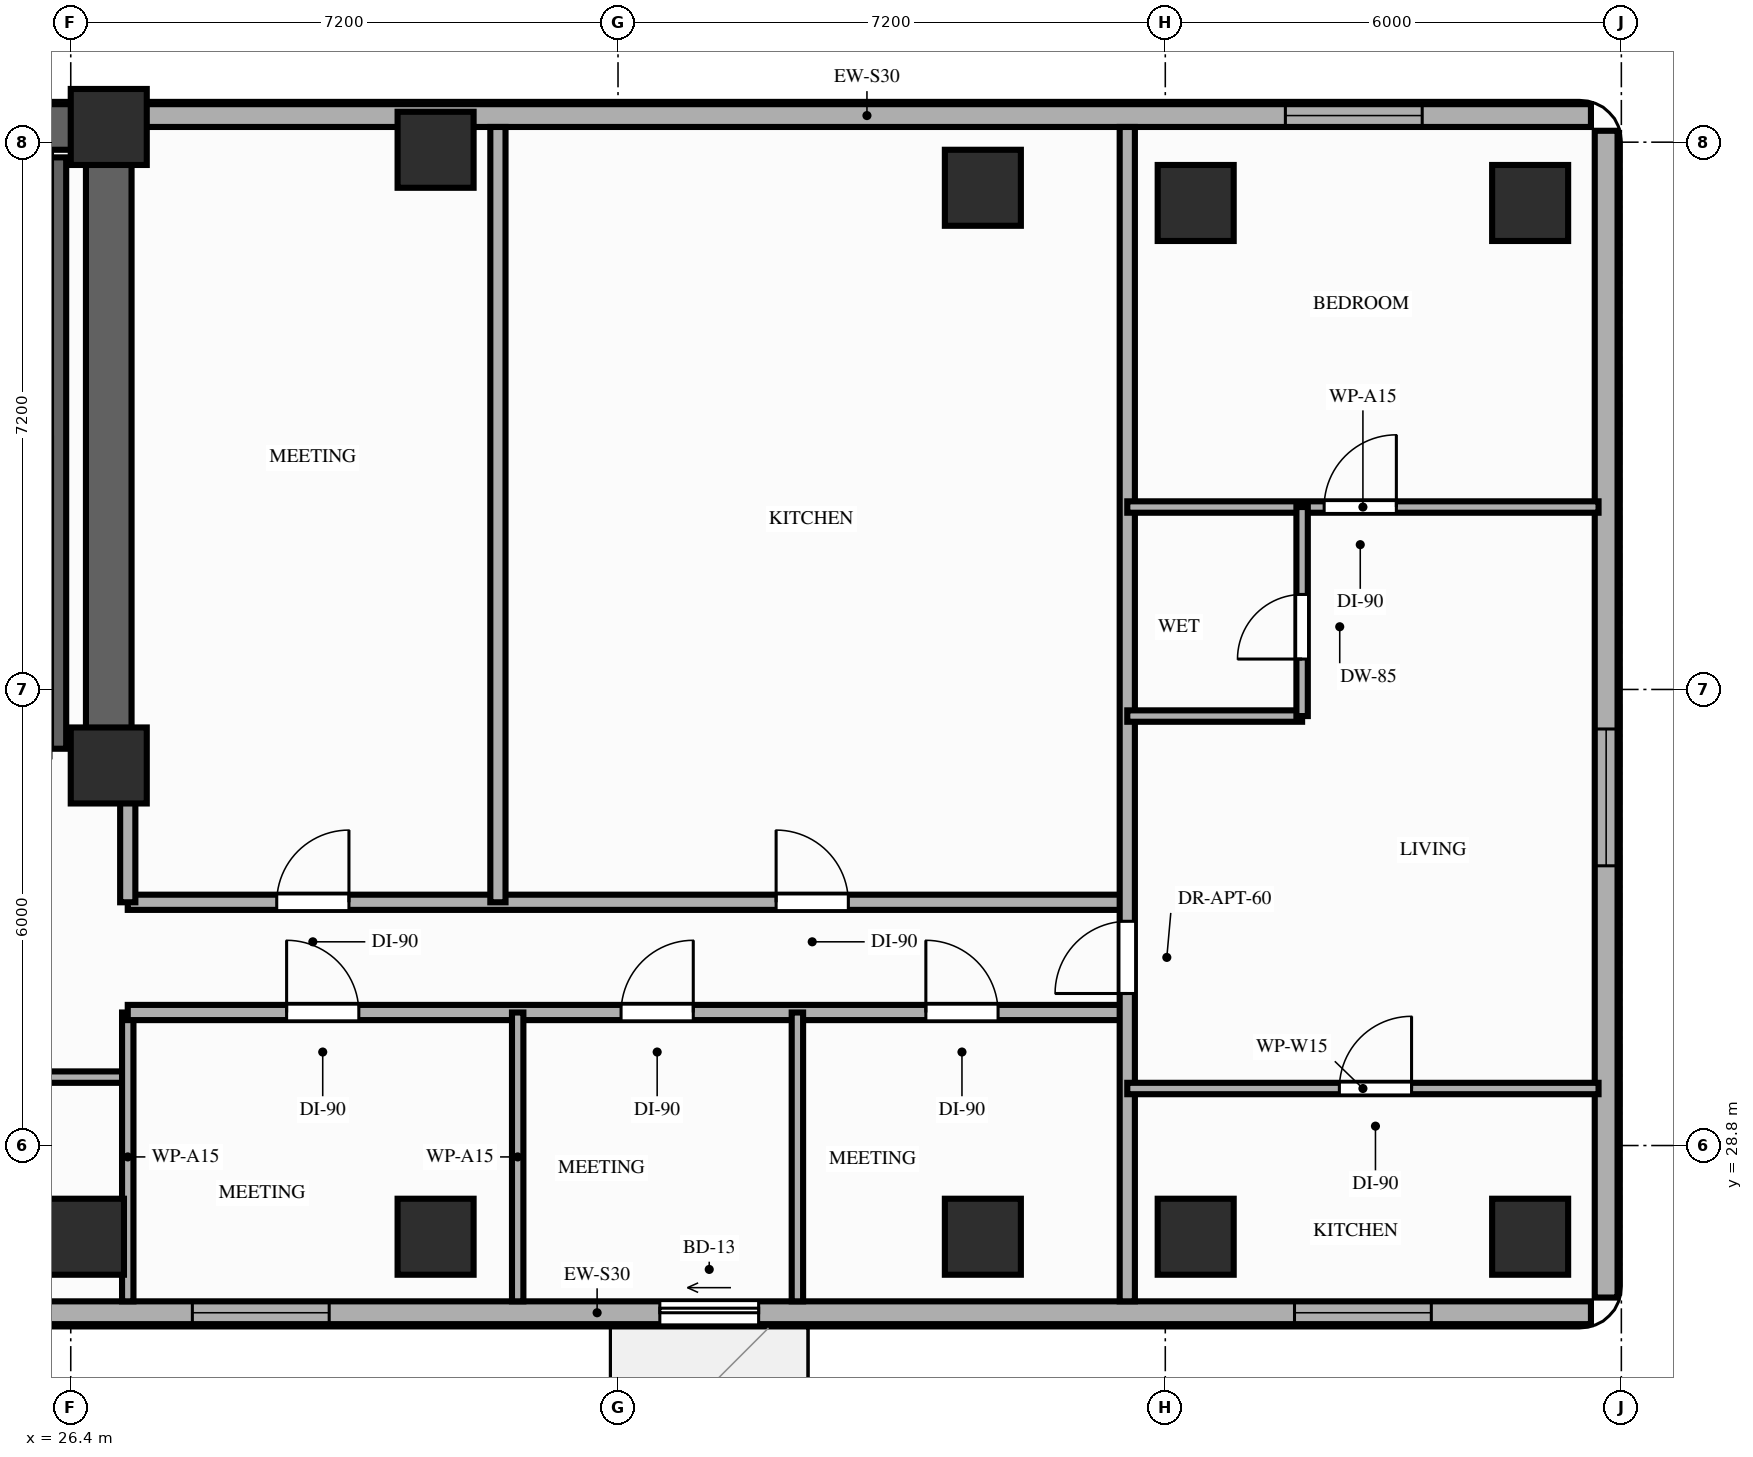
"""IFC4 building model, lengths in metres.
Left out: names, types, materials, properties, quantities, classifications, styles, units other than length and angle.
Written with IfcOpenShell. Run it as: python <this file> out.ifc"""

import sys

from ifc_helpers import new_model, si_unit, direction, frame, frame_2d, origin, origin_2d, place, context, subcontext, project, spatial, rectangle, extrude, element, fill, save


model = new_model("IFC4")
c1 = context("Model", 3, precision=1e-05, world=origin(), true_north=direction((0.0, 1.0)))
c2 = subcontext(c1, "Body", "Model", "MODEL_VIEW")
j1 = project(units=[si_unit("LENGTHUNIT", "METRE"), si_unit("PLANEANGLEUNIT", "RADIAN")], contexts=[c1])
p1 = place(None, origin())
s1 = spatial("IfcSite", under=j1, at=p1, CompositionType="ELEMENT")
p2 = place(p1, origin())
s2 = spatial("IfcBuilding", under=s1, at=p2, CompositionType="ELEMENT")
p3 = place(p2, frame((0.0, 0.0, 129.8)))
s3 = spatial("IfcBuildingStorey", under=s2, at=p3, CompositionType="ELEMENT", Elevation=129.8)
for number, where, z_axis, x_axis in (
    (1, (26.9, 33.8, 0.0), (0.0, 0.0, 1.0), (1.0, 0.0, 0.0)),
    (2, (26.9, 42.2, 0.0), (0.0, 0.0, 1.0), (1.0, 0.0, 0.0)),
    (3, (26.6, 27.6, 0.0), (0.0, 0.0, 1.0), (1.0, 0.0, 0.0)),
    (4, (31.2, 27.6, 0.0), (0.0, 0.0, 1.0), (1.0, 0.0, 0.0)),
    (5, (31.2, 41.9, 0.0), (0.0, 0.0, 1.0), (1.0, 0.0, 0.0)),
    (6, (38.4, 27.6, 0.0), (0.0, 0.0, 1.0), (1.0, 0.0, 0.0)),
    (7, (38.4, 41.4, 0.0), (0.0, 0.0, 1.0), (1.0, 0.0, 0.0)),
    (8, (41.2, 27.6, 0.0), (0.0, 0.0, 1.0), (1.0, 0.0, 0.0)),
    (9, (41.2, 41.2, 0.0), (0.0, 0.0, 1.0), (1.0, 0.0, 0.0)),
    (10, (45.6, 27.6, 0.0), (0.0, 0.0, 1.0), (1.0, 0.0, 0.0)),
    (11, (45.6, 41.2, 0.0), (0.0, 0.0, 1.0), (1.0, 0.0, 0.0)),
):
    element("IfcColumn", number, at=place(p3, frame(where, z_axis=z_axis, x_axis=x_axis)), inside=s3, PredefinedType="COLUMN", context=c2, shape_type="SweptSolid", body=[
        extrude(rectangle(XDim=1.0, YDim=1.0, at=origin_2d()), origin(), (0.0, 0.0, 1.0), 3.2),
    ])
p4 = place(p3, frame((46.4, 42.35, 0.0), z_axis=(0.0, 0.0, 1.0), x_axis=(-1.0, 0.0, 0.0)))
e12 = element("IfcWall", 12, at=p4, inside=s3, PredefinedType="STANDARD", context=c2, shape_type="SweptSolid", body=[
    extrude(rectangle(XDim=19.05, YDim=0.3, at=frame_2d((9.525, 0.0))), origin(), (0.0, 0.0, 1.0), 2.45),
])
p5 = place(p4, frame((2.22, 0.0, 0.85)))
e13 = element("IfcOpeningElement", 13, at=p5, cuts=e12, PredefinedType="OPENING", context=c2, shape_type="SweptSolid", body=[
    extrude(rectangle(XDim=1.8, YDim=1.35, at=frame_2d((0.9, 0.675))), frame((0.0, 0.16, 0.0), z_axis=(0.0, -1.0, 0.0), x_axis=(1.0, 0.0, 0.0)), (0.0, 0.0, 1.0), 0.32),
])
p6 = place(p3, frame((20.25, 26.6, 0.0), z_axis=(0.0, 0.0, 1.0), x_axis=(1.0, 0.0, 0.0)))
e14 = element("IfcWall", 14, at=p6, inside=s3, PredefinedType="STANDARD", context=c2, shape_type="SweptSolid", body=[
    extrude(rectangle(XDim=26.15, YDim=0.3, at=frame_2d((13.075, 0.0))), origin(), (0.0, 0.0, 1.0), 2.71),
])
p7 = place(p6, frame((13.9, 0.0, 0.0)))
e15 = element("IfcOpeningElement", 15, at=p7, cuts=e14, PredefinedType="OPENING", context=c2, shape_type="SweptSolid", body=[
    extrude(rectangle(XDim=1.3, YDim=2.08, at=frame_2d((0.65, 1.04))), frame((0.0, 0.16, 0.0), z_axis=(0.0, -1.0, 0.0), x_axis=(1.0, 0.0, 0.0)), (0.0, 0.0, 1.0), 0.32),
])
p8 = place(p6, frame((2.25, 0.0, 0.85)))
e16 = element("IfcOpeningElement", 16, at=p8, cuts=e14, PredefinedType="OPENING", context=c2, shape_type="SweptSolid", body=[
    extrude(rectangle(XDim=1.8, YDim=1.61, at=frame_2d((0.9, 0.805))), frame((0.0, 0.16, 0.0), z_axis=(0.0, -1.0, 0.0), x_axis=(1.0, 0.0, 0.0)), (0.0, 0.0, 1.0), 0.32),
])
p9 = place(p6, frame((7.75, 0.0, 0.85)))
e17 = element("IfcOpeningElement", 17, at=p9, cuts=e14, PredefinedType="OPENING", context=c2, shape_type="SweptSolid", body=[
    extrude(rectangle(XDim=1.8, YDim=1.61, at=frame_2d((0.9, 0.805))), frame((0.0, 0.16, 0.0), z_axis=(0.0, -1.0, 0.0), x_axis=(1.0, 0.0, 0.0)), (0.0, 0.0, 1.0), 0.32),
])
p10 = place(p6, frame((22.25, 0.0, 0.85)))
e18 = element("IfcOpeningElement", 18, at=p10, cuts=e14, PredefinedType="OPENING", context=c2, shape_type="SweptSolid", body=[
    extrude(rectangle(XDim=1.8, YDim=1.61, at=frame_2d((0.9, 0.805))), frame((0.0, 0.16, 0.0), z_axis=(0.0, -1.0, 0.0), x_axis=(1.0, 0.0, 0.0)), (0.0, 0.0, 1.0), 0.32),
])
p11 = place(p3, frame((46.6, 26.8, 0.0), z_axis=(0.0, 0.0, 1.0), x_axis=(0.0, 1.0, 0.0)))
e19 = element("IfcWall", 19, at=p11, inside=s3, PredefinedType="STANDARD", context=c2, shape_type="SweptSolid", body=[
    extrude(rectangle(XDim=15.35, YDim=0.3, at=frame_2d((7.675, 0.0))), origin(), (0.0, 0.0, 1.0), 3.02),
])
p12 = place(p11, frame((5.68, 0.0, 0.85)))
e20 = element("IfcOpeningElement", 20, at=p12, cuts=e19, PredefinedType="OPENING", context=c2, shape_type="SweptSolid", body=[
    extrude(rectangle(XDim=1.8, YDim=1.75, at=frame_2d((0.9, 0.875))), frame((0.0, 0.16, 0.0), z_axis=(0.0, -1.0, 0.0), x_axis=(1.0, 0.0, 0.0)), (0.0, 0.0, 1.0), 0.32),
])
p13 = place(p3, frame((6.45, 42.2, 0.0), z_axis=(0.0, 0.0, 1.0), x_axis=(1.0, 0.0, 0.0)))
e21 = element("IfcWall", 21, at=p13, inside=s3, PredefinedType="SHEAR", context=c2, shape_type="SweptSolid", body=[
    extrude(rectangle(XDim=20.45, YDim=0.6, at=frame_2d((10.225, 0.0))), origin(), (0.0, 0.0, 1.0), 3.02),
])
p14 = place(p3, frame((26.9, 33.8, 0.0), z_axis=(0.0, 0.0, 1.0), x_axis=(0.0, 1.0, 0.0)))
e22 = element("IfcWall", 22, at=p14, inside=s3, PredefinedType="SHEAR", context=c2, shape_type="SweptSolid", body=[
    extrude(rectangle(XDim=7.95, YDim=0.6, at=frame_2d((3.975, 0.0))), origin(), (0.0, 0.0, 1.0), 3.02),
])
p15 = place(p3, frame((26.24, 34.02, 0.0), z_axis=(0.0, 0.0, 1.0), x_axis=(0.0, 1.0, 0.0)))
e23 = element("IfcWall", 23, at=p15, inside=s3, PredefinedType="SHEAR", context=c2, shape_type="SweptSolid", body=[
    extrude(rectangle(XDim=7.78, YDim=0.2, at=frame_2d((3.89, 0.0))), origin(), (0.0, 0.0, 1.0), 3.02),
])
p16 = place(p3, frame((20.45, 29.7, 0.0), z_axis=(0.0, 0.0, 1.0), x_axis=(1.0, 0.0, 0.0)))
e24 = element("IfcWall", 24, at=p16, inside=s3, PredefinedType="PARTITIONING", context=c2, shape_type="SweptSolid", body=[
    extrude(rectangle(XDim=6.7, YDim=0.15, at=frame_2d((3.35, 0.0))), origin(), (0.0, 0.0, 1.0), 3.02),
])
p17 = place(p16, frame((2.8, 0.0, 0.0)))
e25 = element("IfcOpeningElement", 25, at=p17, cuts=e24, PredefinedType="OPENING", context=c2, shape_type="SweptSolid", body=[
    extrude(rectangle(XDim=0.95, YDim=2.15, at=frame_2d((0.475, 1.075))), frame((0.0, 0.085, 0.0), z_axis=(0.0, -1.0, 0.0), x_axis=(1.0, 0.0, 0.0)), (0.0, 0.0, 1.0), 0.17),
])
p18 = place(p3, frame((27.15, 26.75, 0.0), z_axis=(0.0, 0.0, 1.0), x_axis=(0.0, 1.0, 0.0)))
e26 = element("IfcWall", 26, at=p18, inside=s3, PredefinedType="PARTITIONING", context=c2, shape_type="SweptSolid", body=[
    extrude(rectangle(XDim=3.8, YDim=0.15, at=frame_2d((1.9, 0.0))), origin(), (0.0, 0.0, 1.0), 2.45),
])
p19 = place(p3, frame((27.15, 30.55, 0.0), z_axis=(0.0, 0.0, 1.0), x_axis=(1.0, 0.0, 0.0)))
e27 = element("IfcWall", 27, at=p19, inside=s3, PredefinedType="PARTITIONING", context=c2, shape_type="SweptSolid", body=[
    extrude(rectangle(XDim=13.15, YDim=0.2, at=frame_2d((6.575, 0.0))), origin(), (0.0, 0.0, 1.0), 2.45),
])
p20 = place(p19, frame((2.09, 0.0, 0.0)))
e28 = element("IfcOpeningElement", 28, at=p20, cuts=e27, PredefinedType="OPENING", context=c2, shape_type="SweptSolid", body=[
    extrude(rectangle(XDim=0.95, YDim=2.15, at=frame_2d((0.475, 1.075))), frame((0.0, 0.11, 0.0), z_axis=(0.0, -1.0, 0.0), x_axis=(1.0, 0.0, 0.0)), (0.0, 0.0, 1.0), 0.22),
])
p21 = place(p19, frame((6.49, 0.0, 0.0)))
e29 = element("IfcOpeningElement", 29, at=p21, cuts=e27, PredefinedType="OPENING", context=c2, shape_type="SweptSolid", body=[
    extrude(rectangle(XDim=0.95, YDim=2.15, at=frame_2d((0.475, 1.075))), frame((0.0, 0.11, 0.0), z_axis=(0.0, -1.0, 0.0), x_axis=(1.0, 0.0, 0.0)), (0.0, 0.0, 1.0), 0.22),
])
p22 = place(p19, frame((10.5, 0.0, 0.0)))
e30 = element("IfcOpeningElement", 30, at=p22, cuts=e27, PredefinedType="OPENING", context=c2, shape_type="SweptSolid", body=[
    extrude(rectangle(XDim=0.95, YDim=2.15, at=frame_2d((0.475, 1.075))), frame((0.0, 0.11, 0.0), z_axis=(0.0, -1.0, 0.0), x_axis=(1.0, 0.0, 0.0)), (0.0, 0.0, 1.0), 0.22),
])
p23 = place(p3, frame((27.15, 32.0, 0.0), z_axis=(0.0, 0.0, 1.0), x_axis=(1.0, 0.0, 0.0)))
e31 = element("IfcWall", 31, at=p23, inside=s3, PredefinedType="PARTITIONING", context=c2, shape_type="SweptSolid", body=[
    extrude(rectangle(XDim=13.15, YDim=0.2, at=frame_2d((6.575, 0.0))), origin(), (0.0, 0.0, 1.0), 2.45),
])
p24 = place(p23, frame((1.96, 0.0, 0.0)))
e32 = element("IfcOpeningElement", 32, at=p24, cuts=e31, PredefinedType="OPENING", context=c2, shape_type="SweptSolid", body=[
    extrude(rectangle(XDim=0.95, YDim=2.15, at=frame_2d((0.475, 1.075))), frame((0.0, 0.11, 0.0), z_axis=(0.0, -1.0, 0.0), x_axis=(1.0, 0.0, 0.0)), (0.0, 0.0, 1.0), 0.22),
])
p25 = place(p23, frame((8.53, 0.0, 0.0)))
e33 = element("IfcOpeningElement", 33, at=p25, cuts=e31, PredefinedType="OPENING", context=c2, shape_type="SweptSolid", body=[
    extrude(rectangle(XDim=0.95, YDim=2.15, at=frame_2d((0.475, 1.075))), frame((0.0, 0.11, 0.0), z_axis=(0.0, -1.0, 0.0), x_axis=(1.0, 0.0, 0.0)), (0.0, 0.0, 1.0), 0.22),
])
p26 = place(p3, frame((27.15, 32.0, 0.0), z_axis=(0.0, 0.0, 1.0), x_axis=(0.0, 1.0, 0.0)))
e34 = element("IfcWall", 34, at=p26, inside=s3, PredefinedType="PARTITIONING", context=c2, shape_type="SweptSolid", body=[
    extrude(rectangle(XDim=1.68, YDim=0.2, at=frame_2d((0.84, 0.0))), origin(), (0.0, 0.0, 1.0), 2.45),
])
p27 = place(p3, frame((40.3, 26.75, 0.0), z_axis=(0.0, 0.0, 1.0), x_axis=(0.0, 1.0, 0.0)))
e35 = element("IfcWall", 35, at=p27, inside=s3, PredefinedType="PARTITIONING", context=c2, shape_type="SweptSolid", body=[
    extrude(rectangle(XDim=15.45, YDim=0.2, at=frame_2d((7.725, 0.0))), origin(), (0.0, 0.0, 1.0), 2.45),
])
p28 = place(p27, frame((4.05, 0.0, 0.0)))
e36 = element("IfcOpeningElement", 36, at=p28, cuts=e35, PredefinedType="OPENING", context=c2, shape_type="SweptSolid", body=[
    extrude(rectangle(XDim=0.95, YDim=2.15, at=frame_2d((0.475, 1.075))), frame((0.0, 0.11, 0.0), z_axis=(0.0, -1.0, 0.0), x_axis=(1.0, 0.0, 0.0)), (0.0, 0.0, 1.0), 0.22),
])
p29 = place(p3, frame((40.3, 29.55, 0.0), z_axis=(0.0, 0.0, 1.0), x_axis=(1.0, 0.0, 0.0)))
e37 = element("IfcWall", 37, at=p29, inside=s3, PredefinedType="PARTITIONING", context=c2, shape_type="SweptSolid", body=[
    extrude(rectangle(XDim=6.2, YDim=0.15, at=frame_2d((3.1, 0.0))), origin(), (0.0, 0.0, 1.0), 2.45),
])
p30 = place(p29, frame((2.79, 0.0, 0.0)))
e38 = element("IfcOpeningElement", 38, at=p30, cuts=e37, PredefinedType="OPENING", context=c2, shape_type="SweptSolid", body=[
    extrude(rectangle(XDim=0.95, YDim=2.15, at=frame_2d((0.475, 1.075))), frame((0.0, 0.085, 0.0), z_axis=(0.0, -1.0, 0.0), x_axis=(1.0, 0.0, 0.0)), (0.0, 0.0, 1.0), 0.17),
])
p31 = place(p3, frame((40.3, 37.2, 0.0), z_axis=(0.0, 0.0, 1.0), x_axis=(1.0, 0.0, 0.0)))
e39 = element("IfcWall", 39, at=p31, inside=s3, PredefinedType="PARTITIONING", context=c2, shape_type="SweptSolid", body=[
    extrude(rectangle(XDim=6.2, YDim=0.15, at=frame_2d((3.1, 0.0))), origin(), (0.0, 0.0, 1.0), 2.45),
])
p32 = place(p31, frame((2.59, 0.0, 0.0)))
e40 = element("IfcOpeningElement", 40, at=p32, cuts=e39, PredefinedType="OPENING", context=c2, shape_type="SweptSolid", body=[
    extrude(rectangle(XDim=0.95, YDim=2.15, at=frame_2d((0.475, 1.075))), frame((0.0, 0.085, 0.0), z_axis=(0.0, -1.0, 0.0), x_axis=(1.0, 0.0, 0.0)), (0.0, 0.0, 1.0), 0.17),
])
p33 = place(p3, frame((40.3, 34.45, 0.0), z_axis=(0.0, 0.0, 1.0), x_axis=(1.0, 0.0, 0.0)))
e41 = element("IfcWall", 41, at=p33, inside=s3, PredefinedType="PARTITIONING", context=c2, shape_type="SweptSolid", body=[
    extrude(rectangle(XDim=2.3, YDim=0.15, at=frame_2d((1.15, 0.0))), origin(), (0.0, 0.0, 1.0), 2.45),
])
p34 = place(p3, frame((42.6, 34.45, 0.0), z_axis=(0.0, 0.0, 1.0), x_axis=(0.0, 1.0, 0.0)))
e42 = element("IfcWall", 42, at=p34, inside=s3, PredefinedType="PARTITIONING", context=c2, shape_type="SweptSolid", body=[
    extrude(rectangle(XDim=2.75, YDim=0.15, at=frame_2d((1.375, 0.0))), origin(), (0.0, 0.0, 1.0), 2.61),
])
p35 = place(p34, frame((0.75, 0.0, 0.0)))
e43 = element("IfcOpeningElement", 43, at=p35, cuts=e42, PredefinedType="OPENING", context=c2, shape_type="SweptSolid", body=[
    extrude(rectangle(XDim=0.85, YDim=2.1, at=frame_2d((0.425, 1.05))), frame((0.0, 0.085, 0.0), z_axis=(0.0, -1.0, 0.0), x_axis=(1.0, 0.0, 0.0)), (0.0, 0.0, 1.0), 0.17),
])
for number, where, z_axis, x_axis in (
    (44, (32.28, 26.75, 0.0), (0.0, 0.0, 1.0), (0.0, 1.0, 0.0)),
    (45, (35.96, 26.75, 0.0), (0.0, 0.0, 1.0), (0.0, 1.0, 0.0)),
):
    element("IfcWall", number, at=place(p3, frame(where, z_axis=z_axis, x_axis=x_axis)), inside=s3, PredefinedType="PARTITIONING", context=c2, shape_type="SweptSolid", body=[
        extrude(rectangle(XDim=3.8, YDim=0.15, at=frame_2d((1.9, 0.0))), origin(), (0.0, 0.0, 1.0), 2.45),
    ])
p36 = place(p3, frame((32.02, 32.0, 0.0), z_axis=(0.0, 0.0, 1.0), x_axis=(0.0, 1.0, 0.0)))
e46 = element("IfcWall", 46, at=p36, inside=s3, PredefinedType="PARTITIONING", context=c2, shape_type="SweptSolid", body=[
    extrude(rectangle(XDim=10.2, YDim=0.2, at=frame_2d((5.1, 0.0))), origin(), (0.0, 0.0, 1.0), 2.45),
])
p37 = place(p7, origin())
e47 = element("IfcDoor", 47, at=p37, inside=s3, OperationType="SLIDING_TO_LEFT", PredefinedType="DOOR", context=c2, shape_type="SweptSolid", body=[
    extrude(rectangle(XDim=1.3, YDim=2.08, at=frame_2d((0.65, 1.04))), frame((0.0, 0.025, 0.0), z_axis=(0.0, -1.0, 0.0), x_axis=(1.0, 0.0, 0.0)), (0.0, 0.0, 1.0), 0.05),
])
fill(e15, e47)
p38 = place(p12, origin())
e48 = element("IfcWindow", 48, at=p38, inside=s3, PartitioningType="SINGLE_PANEL", PredefinedType="WINDOW", context=c2, shape_type="SweptSolid", body=[
    extrude(rectangle(XDim=1.8, YDim=1.75, at=frame_2d((0.9, 0.875))), frame((0.0, 0.03, 0.0), z_axis=(0.0, -1.0, 0.0), x_axis=(1.0, 0.0, 0.0)), (0.0, 0.0, 1.0), 0.06),
])
fill(e20, e48)
p39 = place(p5, origin())
e49 = element("IfcWindow", 49, at=p39, inside=s3, PartitioningType="SINGLE_PANEL", PredefinedType="WINDOW", context=c2, shape_type="SweptSolid", body=[
    extrude(rectangle(XDim=1.8, YDim=1.35, at=frame_2d((0.9, 0.675))), frame((0.0, 0.03, 0.0), z_axis=(0.0, -1.0, 0.0), x_axis=(1.0, 0.0, 0.0)), (0.0, 0.0, 1.0), 0.06),
])
fill(e13, e49)
p40 = place(p9, origin())
e50 = element("IfcWindow", 50, at=p40, inside=s3, PartitioningType="SINGLE_PANEL", PredefinedType="WINDOW", context=c2, shape_type="SweptSolid", body=[
    extrude(rectangle(XDim=1.8, YDim=1.61, at=frame_2d((0.9, 0.805))), frame((0.0, 0.03, 0.0), z_axis=(0.0, -1.0, 0.0), x_axis=(1.0, 0.0, 0.0)), (0.0, 0.0, 1.0), 0.06),
])
fill(e17, e50)
p41 = place(p10, origin())
e51 = element("IfcWindow", 51, at=p41, inside=s3, PartitioningType="SINGLE_PANEL", PredefinedType="WINDOW", context=c2, shape_type="SweptSolid", body=[
    extrude(rectangle(XDim=1.8, YDim=1.61, at=frame_2d((0.9, 0.805))), frame((0.0, 0.03, 0.0), z_axis=(0.0, -1.0, 0.0), x_axis=(1.0, 0.0, 0.0)), (0.0, 0.0, 1.0), 0.06),
])
fill(e18, e51)
p42 = place(p28, origin())
e52 = element("IfcDoor", 52, at=p42, inside=s3, OperationType="SINGLE_SWING_LEFT", PredefinedType="DOOR", context=c2, shape_type="SweptSolid", body=[
    extrude(rectangle(XDim=0.95, YDim=2.15, at=frame_2d((0.475, 1.075))), frame((0.0, 0.025, 0.0), z_axis=(0.0, -1.0, 0.0), x_axis=(1.0, 0.0, 0.0)), (0.0, 0.0, 1.0), 0.05),
])
fill(e36, e52)
p43 = place(p32, origin())
e53 = element("IfcDoor", 53, at=p43, inside=s3, OperationType="SINGLE_SWING_RIGHT", PredefinedType="DOOR", context=c2, shape_type="SweptSolid", body=[
    extrude(rectangle(XDim=0.95, YDim=2.15, at=frame_2d((0.475, 1.075))), frame((0.0, 0.025, 0.0), z_axis=(0.0, -1.0, 0.0), x_axis=(1.0, 0.0, 0.0)), (0.0, 0.0, 1.0), 0.05),
])
fill(e40, e53)
p44 = place(p35, origin())
e54 = element("IfcDoor", 54, at=p44, inside=s3, OperationType="SINGLE_SWING_LEFT", PredefinedType="DOOR", context=c2, shape_type="SweptSolid", body=[
    extrude(rectangle(XDim=0.85, YDim=2.1, at=frame_2d((0.425, 1.05))), frame((0.0, 0.025, 0.0), z_axis=(0.0, -1.0, 0.0), x_axis=(1.0, 0.0, 0.0)), (0.0, 0.0, 1.0), 0.05),
])
fill(e43, e54)
p45 = place(p30, origin())
e55 = element("IfcDoor", 55, at=p45, inside=s3, OperationType="SINGLE_SWING_RIGHT", PredefinedType="DOOR", context=c2, shape_type="SweptSolid", body=[
    extrude(rectangle(XDim=0.95, YDim=2.15, at=frame_2d((0.475, 1.075))), frame((0.0, 0.025, 0.0), z_axis=(0.0, -1.0, 0.0), x_axis=(1.0, 0.0, 0.0)), (0.0, 0.0, 1.0), 0.05),
])
fill(e38, e55)
p46 = place(p20, origin())
e56 = element("IfcDoor", 56, at=p46, inside=s3, OperationType="SINGLE_SWING_LEFT", PredefinedType="DOOR", context=c2, shape_type="SweptSolid", body=[
    extrude(rectangle(XDim=0.95, YDim=2.15, at=frame_2d((0.475, 1.075))), frame((0.0, 0.025, 0.0), z_axis=(0.0, -1.0, 0.0), x_axis=(1.0, 0.0, 0.0)), (0.0, 0.0, 1.0), 0.05),
])
fill(e28, e56)
p47 = place(p21, origin())
e57 = element("IfcDoor", 57, at=p47, inside=s3, OperationType="SINGLE_SWING_RIGHT", PredefinedType="DOOR", context=c2, shape_type="SweptSolid", body=[
    extrude(rectangle(XDim=0.95, YDim=2.15, at=frame_2d((0.475, 1.075))), frame((0.0, 0.025, 0.0), z_axis=(0.0, -1.0, 0.0), x_axis=(1.0, 0.0, 0.0)), (0.0, 0.0, 1.0), 0.05),
])
fill(e29, e57)
p48 = place(p22, origin())
e58 = element("IfcDoor", 58, at=p48, inside=s3, OperationType="SINGLE_SWING_LEFT", PredefinedType="DOOR", context=c2, shape_type="SweptSolid", body=[
    extrude(rectangle(XDim=0.95, YDim=2.15, at=frame_2d((0.475, 1.075))), frame((0.0, 0.025, 0.0), z_axis=(0.0, -1.0, 0.0), x_axis=(1.0, 0.0, 0.0)), (0.0, 0.0, 1.0), 0.05),
])
fill(e30, e58)
p49 = place(p24, origin())
e59 = element("IfcDoor", 59, at=p49, inside=s3, OperationType="SINGLE_SWING_RIGHT", PredefinedType="DOOR", context=c2, shape_type="SweptSolid", body=[
    extrude(rectangle(XDim=0.95, YDim=2.15, at=frame_2d((0.475, 1.075))), frame((0.0, 0.025, 0.0), z_axis=(0.0, -1.0, 0.0), x_axis=(1.0, 0.0, 0.0)), (0.0, 0.0, 1.0), 0.05),
])
fill(e32, e59)
p50 = place(p25, origin())
e60 = element("IfcDoor", 60, at=p50, inside=s3, OperationType="SINGLE_SWING_LEFT", PredefinedType="DOOR", context=c2, shape_type="SweptSolid", body=[
    extrude(rectangle(XDim=0.95, YDim=2.15, at=frame_2d((0.475, 1.075))), frame((0.0, 0.025, 0.0), z_axis=(0.0, -1.0, 0.0), x_axis=(1.0, 0.0, 0.0)), (0.0, 0.0, 1.0), 0.05),
])
fill(e33, e60)
save(model, sys.argv[1])
